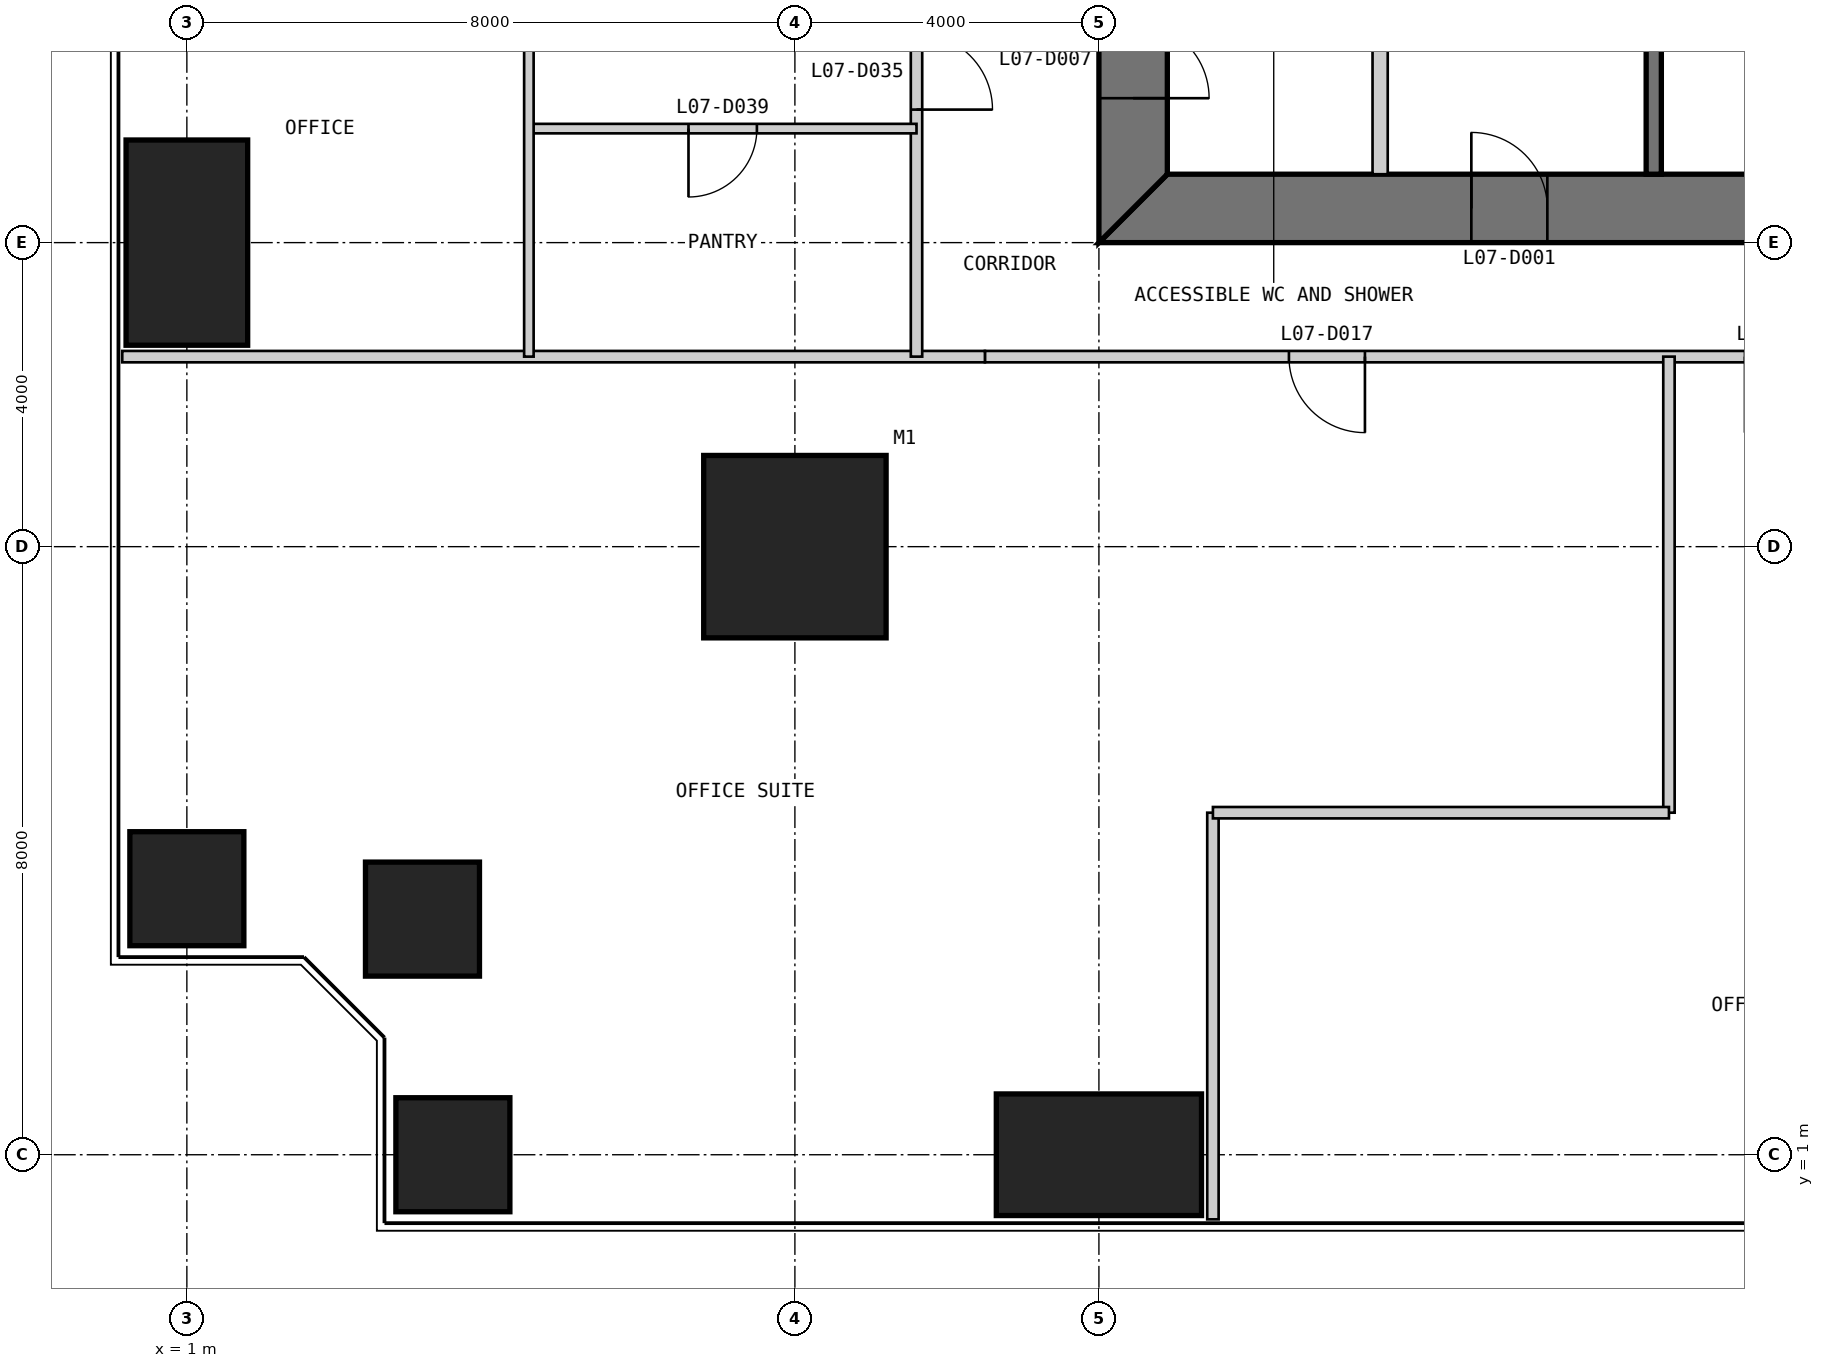
"""IFC4 building model, lengths in metres.
Left out: names, types, materials, properties, quantities, classifications, styles, units other than length and angle.
Written with IfcOpenShell. Run it as: python <this file> out.ifc"""

import sys

from ifc_helpers import new_model, si_unit, direction, frame, frame_2d, origin, origin_2d, place, context, subcontext, project, spatial, polyline, rectangle, outline, extrude, element, fill, save


model = new_model("IFC4")
c1 = context("Model", 3, precision=1e-05, world=origin(), true_north=direction((0.0, 1.0)))
c2 = subcontext(c1, "Body", "Model", "MODEL_VIEW")
j1 = project(units=[si_unit("LENGTHUNIT", "METRE"), si_unit("PLANEANGLEUNIT", "RADIAN")], contexts=[c1])
p1 = place(None, origin())
s1 = spatial("IfcSite", under=j1, at=p1, CompositionType="ELEMENT")
p2 = place(p1, origin())
s2 = spatial("IfcBuilding", under=s1, at=p2, CompositionType="ELEMENT")
p3 = place(p2, frame((0.0, 0.0, 35.0)))
s3 = spatial("IfcBuildingStorey", under=s2, at=p3, CompositionType="ELEMENT", Elevation=35.0)
p4 = place(p3, frame((9.0, 9.0, 0.0), z_axis=(0.0, 0.0, 1.0), x_axis=(1.0, 0.0, 0.0)))
e1 = element("IfcColumn", 1, at=p4, inside=s3, PredefinedType="COLUMN", context=c2, shape_type="SweptSolid", body=[
    extrude(rectangle(XDim=2.4, YDim=2.4, at=origin_2d()), origin(), (0.0, 0.0, 1.0), 4.0),
])
p5 = place(p3, frame((4.5, 1.0, 0.0), z_axis=(0.0, 0.0, 1.0), x_axis=(1.0, 0.0, 0.0)))
e2 = element("IfcColumn", 2, at=p5, inside=s3, PredefinedType="COLUMN", context=c2, shape_type="SweptSolid", body=[
    extrude(rectangle(XDim=1.5, YDim=1.5, at=origin_2d()), origin(), (0.0, 0.0, 1.0), 4.0),
])
p6 = place(p3, frame((13.0, 1.0, 0.0), z_axis=(0.0, 0.0, 1.0), x_axis=(1.0, 0.0, 0.0)))
e3 = element("IfcColumn", 3, at=p6, inside=s3, PredefinedType="COLUMN", context=c2, shape_type="SweptSolid", body=[
    extrude(rectangle(XDim=2.7, YDim=1.6, at=origin_2d()), origin(), (0.0, 0.0, 1.0), 4.0),
])
p7 = place(p3, frame((1.0, 13.0, 0.0), z_axis=(0.0, 0.0, 1.0), x_axis=(1.0, 0.0, 0.0)))
e4 = element("IfcColumn", 4, at=p7, inside=s3, PredefinedType="COLUMN", context=c2, shape_type="SweptSolid", body=[
    extrude(rectangle(XDim=1.6, YDim=2.7, at=origin_2d()), origin(), (0.0, 0.0, 1.0), 4.0),
])
for number, where, z_axis, x_axis in (
    (5, (1.0, 4.5, 0.0), (0.0, 0.0, 1.0), (1.0, 0.0, 0.0)),
    (6, (4.1, 4.1, 0.0), (0.0, 0.0, 1.0), (1.0, 0.0, 0.0)),
):
    element("IfcColumn", number, at=place(p3, frame(where, z_axis=z_axis, x_axis=x_axis)), inside=s3, PredefinedType="COLUMN", context=c2, shape_type="SweptSolid", body=[
        extrude(rectangle(XDim=1.5, YDim=1.5, at=origin_2d()), origin(), (0.0, 0.0, 1.0), 4.0),
    ])
p8 = place(p3, frame((13.0, 13.45, 0.0), z_axis=(0.0, 0.0, 1.0), x_axis=(1.0, 0.0, 0.0)))
e7 = element("IfcWall", 7, at=p8, inside=s3, PredefinedType="SHEAR", context=c2, shape_type="SweptSolid", body=[
    extrude(outline(polyline([(0.0, -0.45), (24.0, -0.45), (23.1, 0.45), (0.9, 0.45), (0.0, -0.45)])), origin(), (0.0, 0.0, 1.0), 4.0),
])
p9 = place(p8, frame((4.9, 0.0, 0.0)))
e8 = element("IfcOpeningElement", 8, at=p9, cuts=e7, PredefinedType="OPENING", context=c2, shape_type="SweptSolid", body=[
    extrude(rectangle(XDim=1.0, YDim=2.2, at=frame_2d((0.5, 1.1))), frame((0.0, 0.46, 0.0), z_axis=(0.0, -1.0, 0.0), x_axis=(1.0, 0.0, 0.0)), (0.0, 0.0, 1.0), 0.92),
])
p10 = place(p8, frame((8.9, 0.0, 0.0)))
e9 = element("IfcOpeningElement", 9, at=p10, cuts=e7, PredefinedType="OPENING", context=c2, shape_type="SweptSolid", body=[
    extrude(rectangle(XDim=1.1, YDim=2.2, at=frame_2d((0.55, 1.1))), frame((0.0, 0.46, 0.0), z_axis=(0.0, -1.0, 0.0), x_axis=(1.0, 0.0, 0.0)), (0.0, 0.0, 1.0), 0.92),
])
p11 = place(p8, frame((15.05, 0.0, 0.0)))
e10 = element("IfcOpeningElement", 10, at=p11, cuts=e7, PredefinedType="OPENING", context=c2, shape_type="SweptSolid", body=[
    extrude(rectangle(XDim=0.9, YDim=2.2, at=frame_2d((0.45, 1.1))), frame((0.0, 0.46, 0.0), z_axis=(0.0, -1.0, 0.0), x_axis=(1.0, 0.0, 0.0)), (0.0, 0.0, 1.0), 0.92),
])
p12 = place(p8, frame((17.9, 0.0, 0.0)))
e11 = element("IfcOpeningElement", 11, at=p12, cuts=e7, PredefinedType="OPENING", context=c2, shape_type="SweptSolid", body=[
    extrude(rectangle(XDim=1.0, YDim=2.2, at=frame_2d((0.5, 1.1))), frame((0.0, 0.46, 0.0), z_axis=(0.0, -1.0, 0.0), x_axis=(1.0, 0.0, 0.0)), (0.0, 0.0, 1.0), 0.92),
])
p13 = place(p8, frame((21.4, 0.0, 0.0)))
e12 = element("IfcOpeningElement", 12, at=p13, cuts=e7, PredefinedType="OPENING", context=c2, shape_type="SweptSolid", body=[
    extrude(rectangle(XDim=1.0, YDim=2.2, at=frame_2d((0.5, 1.1))), frame((0.0, 0.46, 0.0), z_axis=(0.0, -1.0, 0.0), x_axis=(1.0, 0.0, 0.0)), (0.0, 0.0, 1.0), 0.92),
])
p14 = place(p3, frame((13.45, 36.1, 0.0), z_axis=(0.0, 0.0, 1.0), x_axis=(0.0, -1.0, 0.0)))
e13 = element("IfcWall", 13, at=p14, inside=s3, PredefinedType="SHEAR", context=c2, shape_type="SweptSolid", body=[
    extrude(outline(polyline([(-0.9, -0.45), (23.1, -0.45), (22.2, 0.45), (0.0, 0.45), (-0.9, -0.45)])), origin(), (0.0, 0.0, 1.0), 4.0),
])
p15 = place(p14, frame((20.2, 0.0, 0.0)))
e14 = element("IfcOpeningElement", 14, at=p15, cuts=e13, PredefinedType="OPENING", context=c2, shape_type="SweptSolid", body=[
    extrude(rectangle(XDim=1.0, YDim=2.2, at=frame_2d((0.5, 1.1))), frame((0.0, 0.46, 0.0), z_axis=(0.0, -1.0, 0.0), x_axis=(1.0, 0.0, 0.0)), (0.0, 0.0, 1.0), 0.92),
])
p16 = place(p14, frame((17.25, 0.0, 0.0)))
e15 = element("IfcOpeningElement", 15, at=p16, cuts=e13, PredefinedType="OPENING", context=c2, shape_type="SweptSolid", body=[
    extrude(rectangle(XDim=0.9, YDim=2.2, at=frame_2d((0.45, 1.1))), frame((0.0, 0.46, 0.0), z_axis=(0.0, -1.0, 0.0), x_axis=(1.0, 0.0, 0.0)), (0.0, 0.0, 1.0), 0.92),
])
p17 = place(p3, frame((16.7, 13.9, 0.0), z_axis=(0.0, 0.0, 1.0), x_axis=(0.0, 1.0, 0.0)))
e16 = element("IfcWall", 16, at=p17, inside=s3, PredefinedType="PARTITIONING", context=c2, shape_type="SweptSolid", body=[
    extrude(rectangle(XDim=16.1, YDim=0.2, at=frame_2d((8.05, 0.0))), origin(), (0.0, 0.0, 1.0), 3.8),
])
p18 = place(p17, frame((7.217, 0.0, 0.0)))
e17 = element("IfcOpeningElement", 17, at=p18, cuts=e16, PredefinedType="OPENING", context=c2, shape_type="SweptSolid", body=[
    extrude(rectangle(XDim=1.1, YDim=2.2, at=frame_2d((0.55, 1.1))), frame((0.0, 0.11, 0.0), z_axis=(0.0, -1.0, 0.0), x_axis=(1.0, 0.0, 0.0)), (0.0, 0.0, 1.0), 0.22),
])
p19 = place(p17, frame((10.55, 0.0, 0.0)))
e18 = element("IfcOpeningElement", 18, at=p19, cuts=e16, PredefinedType="OPENING", context=c2, shape_type="SweptSolid", body=[
    extrude(rectangle(XDim=1.1, YDim=2.2, at=frame_2d((0.55, 1.1))), frame((0.0, 0.11, 0.0), z_axis=(0.0, -1.0, 0.0), x_axis=(1.0, 0.0, 0.0)), (0.0, 0.0, 1.0), 0.22),
])
p20 = place(p17, frame((13.883, 0.0, 0.0)))
e19 = element("IfcOpeningElement", 19, at=p20, cuts=e16, PredefinedType="OPENING", context=c2, shape_type="SweptSolid", body=[
    extrude(rectangle(XDim=1.1, YDim=2.2, at=frame_2d((0.55, 1.1))), frame((0.0, 0.11, 0.0), z_axis=(0.0, -1.0, 0.0), x_axis=(1.0, 0.0, 0.0)), (0.0, 0.0, 1.0), 0.22),
])
p21 = place(p3, frame((20.3, 13.9, 0.0), z_axis=(0.0, 0.0, 1.0), x_axis=(0.0, 1.0, 0.0)))
e20 = element("IfcWall", 20, at=p21, inside=s3, PredefinedType="SOLIDWALL", context=c2, shape_type="SweptSolid", body=[
    extrude(rectangle(XDim=16.1, YDim=0.2, at=frame_2d((8.05, 0.0))), origin(), (0.0, 0.0, 1.0), 3.8),
])
p22 = place(p3, frame((11.5, 11.5, 0.0), z_axis=(0.0, 0.0, 1.0), x_axis=(1.0, 0.0, 0.0)))
e21 = element("IfcWall", 21, at=p22, inside=s3, PredefinedType="PARTITIONING", context=c2, shape_type="SweptSolid", body=[
    extrude(rectangle(XDim=27.0, YDim=0.15, at=frame_2d((13.5, 0.0))), origin(), (0.0, 0.0, 1.0), 3.85),
])
p23 = place(p22, frame((4.0, 0.0, 0.0)))
e22 = element("IfcOpeningElement", 22, at=p23, cuts=e21, PredefinedType="OPENING", context=c2, shape_type="SweptSolid", body=[
    extrude(rectangle(XDim=1.0, YDim=2.2, at=frame_2d((0.5, 1.1))), frame((0.0, 0.085, 0.0), z_axis=(0.0, -1.0, 0.0), x_axis=(1.0, 0.0, 0.0)), (0.0, 0.0, 1.0), 0.17),
])
p24 = place(p22, frame((10.0, 0.0, 0.0)))
e23 = element("IfcOpeningElement", 23, at=p24, cuts=e21, PredefinedType="OPENING", context=c2, shape_type="SweptSolid", body=[
    extrude(rectangle(XDim=1.0, YDim=2.2, at=frame_2d((0.5, 1.1))), frame((0.0, 0.085, 0.0), z_axis=(0.0, -1.0, 0.0), x_axis=(1.0, 0.0, 0.0)), (0.0, 0.0, 1.0), 0.17),
])
p25 = place(p22, frame((17.5, 0.0, 0.0)))
e24 = element("IfcOpeningElement", 24, at=p25, cuts=e21, PredefinedType="OPENING", context=c2, shape_type="SweptSolid", body=[
    extrude(rectangle(XDim=1.0, YDim=2.2, at=frame_2d((0.5, 1.1))), frame((0.0, 0.085, 0.0), z_axis=(0.0, -1.0, 0.0), x_axis=(1.0, 0.0, 0.0)), (0.0, 0.0, 1.0), 0.17),
])
p26 = place(p22, frame((23.5, 0.0, 0.0)))
e25 = element("IfcOpeningElement", 25, at=p26, cuts=e21, PredefinedType="OPENING", context=c2, shape_type="SweptSolid", body=[
    extrude(rectangle(XDim=1.0, YDim=2.2, at=frame_2d((0.5, 1.1))), frame((0.0, 0.085, 0.0), z_axis=(0.0, -1.0, 0.0), x_axis=(1.0, 0.0, 0.0)), (0.0, 0.0, 1.0), 0.17),
])
p27 = place(p3, frame((0.15, 11.5, 0.0), z_axis=(0.0, 0.0, 1.0), x_axis=(1.0, 0.0, 0.0)))
e26 = element("IfcWall", 26, at=p27, inside=s3, PredefinedType="PARTITIONING", context=c2, shape_type="SweptSolid", body=[
    extrude(rectangle(XDim=11.35, YDim=0.15, at=frame_2d((5.675, 0.0))), origin(), (0.0, 0.0, 1.0), 3.85),
])
p28 = place(p3, frame((14.5, 0.15, 0.0), z_axis=(0.0, 0.0, 1.0), x_axis=(0.0, 1.0, 0.0)))
e27 = element("IfcWall", 27, at=p28, inside=s3, PredefinedType="PARTITIONING", context=c2, shape_type="SweptSolid", body=[
    extrude(rectangle(XDim=5.35, YDim=0.15, at=frame_2d((2.675, 0.0))), origin(), (0.0, 0.0, 1.0), 3.85),
])
for number, where, z_axis, x_axis in (
    (28, (20.5, 5.5, 0.0), (0.0, 0.0, 1.0), (0.0, 1.0, 0.0)),
    (29, (14.5, 5.5, 0.0), (0.0, 0.0, 1.0), (1.0, 0.0, 0.0)),
):
    element("IfcWall", number, at=place(p3, frame(where, z_axis=z_axis, x_axis=x_axis)), inside=s3, PredefinedType="PARTITIONING", context=c2, shape_type="SweptSolid", body=[
        extrude(rectangle(XDim=6.0, YDim=0.15, at=frame_2d((3.0, 0.0))), origin(), (0.0, 0.0, 1.0), 3.85),
    ])
p29 = place(p3, frame((10.6, 38.5, 0.0), z_axis=(0.0, 0.0, 1.0), x_axis=(0.0, -1.0, 0.0)))
e30 = element("IfcWall", 30, at=p29, inside=s3, PredefinedType="PARTITIONING", context=c2, shape_type="SweptSolid", body=[
    extrude(rectangle(XDim=27.0, YDim=0.15, at=frame_2d((13.5, 0.0))), origin(), (0.0, 0.0, 1.0), 3.85),
])
p30 = place(p29, frame((0.25, 0.0, 0.0)))
e31 = element("IfcOpeningElement", 31, at=p30, cuts=e30, PredefinedType="OPENING", context=c2, shape_type="SweptSolid", body=[
    extrude(rectangle(XDim=1.0, YDim=2.2, at=frame_2d((0.5, 1.1))), frame((0.0, 0.085, 0.0), z_axis=(0.0, -1.0, 0.0), x_axis=(1.0, 0.0, 0.0)), (0.0, 0.0, 1.0), 0.17),
])
p31 = place(p29, frame((22.75, 0.0, 0.0)))
e32 = element("IfcOpeningElement", 32, at=p31, cuts=e30, PredefinedType="OPENING", context=c2, shape_type="SweptSolid", body=[
    extrude(rectangle(XDim=1.0, YDim=2.2, at=frame_2d((0.5, 1.1))), frame((0.0, 0.085, 0.0), z_axis=(0.0, -1.0, 0.0), x_axis=(1.0, 0.0, 0.0)), (0.0, 0.0, 1.0), 0.17),
])
p32 = place(p3, frame((5.5, 14.5, 0.0), z_axis=(0.0, 0.0, 1.0), x_axis=(1.0, 0.0, 0.0)))
e33 = element("IfcWall", 33, at=p32, inside=s3, PredefinedType="PARTITIONING", context=c2, shape_type="SweptSolid", body=[
    extrude(rectangle(XDim=5.1, YDim=0.125, at=frame_2d((2.55, 0.0))), origin(), (0.0, 0.0, 1.0), 3.85),
])
p33 = place(p32, frame((2.1, 0.0, 0.0)))
e34 = element("IfcOpeningElement", 34, at=p33, cuts=e33, PredefinedType="OPENING", context=c2, shape_type="SweptSolid", body=[
    extrude(rectangle(XDim=0.9, YDim=2.2, at=frame_2d((0.45, 1.1))), frame((0.0, 0.073, 0.0), z_axis=(0.0, -1.0, 0.0), x_axis=(1.0, 0.0, 0.0)), (0.0, 0.0, 1.0), 0.145),
])
p34 = place(p3, frame((5.5, 29.5, 0.0), z_axis=(0.0, 0.0, 1.0), x_axis=(0.0, -1.0, 0.0)))
e35 = element("IfcWall", 35, at=p34, inside=s3, PredefinedType="PARTITIONING", context=c2, shape_type="SweptSolid", body=[
    extrude(rectangle(XDim=18.0, YDim=0.125, at=frame_2d((9.0, 0.0))), origin(), (0.0, 0.0, 1.0), 3.85),
])
p35 = place(p34, frame((10.0, 0.0, 0.0)))
e36 = element("IfcOpeningElement", 36, at=p35, cuts=e35, PredefinedType="OPENING", context=c2, shape_type="SweptSolid", body=[
    extrude(rectangle(XDim=1.0, YDim=2.2, at=frame_2d((0.5, 1.1))), frame((0.0, 0.073, 0.0), z_axis=(0.0, -1.0, 0.0), x_axis=(1.0, 0.0, 0.0)), (0.0, 0.0, 1.0), 0.145),
])
p36 = place(p34, frame((13.05, 0.0, 0.0)))
e37 = element("IfcOpeningElement", 37, at=p36, cuts=e35, PredefinedType="OPENING", context=c2, shape_type="SweptSolid", body=[
    extrude(rectangle(XDim=0.9, YDim=2.2, at=frame_2d((0.45, 1.1))), frame((0.0, 0.073, 0.0), z_axis=(0.0, -1.0, 0.0), x_axis=(1.0, 0.0, 0.0)), (0.0, 0.0, 1.0), 0.145),
])
p37 = place(p9, origin())
e38 = element("IfcDoor", 38, at=p37, inside=s3, OperationType="SINGLE_SWING_LEFT", PredefinedType="DOOR", context=c2, shape_type="SweptSolid", body=[
    extrude(rectangle(XDim=1.0, YDim=2.2, at=frame_2d((0.5, 1.1))), frame((0.0, 0.025, 0.0), z_axis=(0.0, -1.0, 0.0), x_axis=(1.0, 0.0, 0.0)), (0.0, 0.0, 1.0), 0.05),
    extrude(outline(polyline([(0.0, 0.0), (0.04, 0.0), (0.04, 2.16), (0.96, 2.16), (0.96, 0.0), (1.0, 0.0), (1.0, 2.2), (0.0, 2.2), (0.0, 0.0)])), frame((0.0, 0.3, 0.0), z_axis=(0.0, -1.0, 0.0), x_axis=(1.0, 0.0, 0.0)), (0.0, 0.0, 1.0), 0.6),
])
fill(e8, e38)
p38 = place(p15, origin())
e39 = element("IfcDoor", 39, at=p38, inside=s3, OperationType="SINGLE_SWING_RIGHT", PredefinedType="DOOR", context=c2, shape_type="SweptSolid", body=[
    extrude(rectangle(XDim=1.0, YDim=2.2, at=frame_2d((0.5, 1.1))), frame((0.0, 0.025, 0.0), z_axis=(0.0, -1.0, 0.0), x_axis=(1.0, 0.0, 0.0)), (0.0, 0.0, 1.0), 0.05),
    extrude(outline(polyline([(0.0, 0.0), (0.04, 0.0), (0.04, 2.16), (0.96, 2.16), (0.96, 0.0), (1.0, 0.0), (1.0, 2.2), (0.0, 2.2), (0.0, 0.0)])), frame((0.0, 0.3, 0.0), z_axis=(0.0, -1.0, 0.0), x_axis=(1.0, 0.0, 0.0)), (0.0, 0.0, 1.0), 0.6),
])
fill(e14, e39)
p39 = place(p23, frame((1.0, 0.0, 0.0), z_axis=(0.0, 0.0, 1.0), x_axis=(-1.0, 0.0, 0.0)))
e40 = element("IfcDoor", 40, at=p39, inside=s3, OperationType="SINGLE_SWING_LEFT", PredefinedType="DOOR", context=c2, shape_type="SweptSolid", body=[
    extrude(rectangle(XDim=1.0, YDim=2.2, at=frame_2d((0.5, 1.1))), frame((0.0, 0.025, 0.0), z_axis=(0.0, -1.0, 0.0), x_axis=(1.0, 0.0, 0.0)), (0.0, 0.0, 1.0), 0.05),
])
fill(e22, e40)
p40 = place(p31, origin())
e41 = element("IfcDoor", 41, at=p40, inside=s3, OperationType="SINGLE_SWING_RIGHT", PredefinedType="DOOR", context=c2, shape_type="SweptSolid", body=[
    extrude(rectangle(XDim=1.0, YDim=2.2, at=frame_2d((0.5, 1.1))), frame((0.0, 0.025, 0.0), z_axis=(0.0, -1.0, 0.0), x_axis=(1.0, 0.0, 0.0)), (0.0, 0.0, 1.0), 0.05),
])
fill(e32, e41)
p41 = place(p33, frame((0.9, 0.0, 0.0), z_axis=(0.0, 0.0, 1.0), x_axis=(-1.0, 0.0, 0.0)))
e42 = element("IfcDoor", 42, at=p41, inside=s3, OperationType="SINGLE_SWING_RIGHT", PredefinedType="DOOR", context=c2, shape_type="SweptSolid", body=[
    extrude(rectangle(XDim=0.9, YDim=2.2, at=frame_2d((0.45, 1.1))), frame((0.0, 0.025, 0.0), z_axis=(0.0, -1.0, 0.0), x_axis=(1.0, 0.0, 0.0)), (0.0, 0.0, 1.0), 0.05),
])
fill(e34, e42)
save(model, sys.argv[1])
